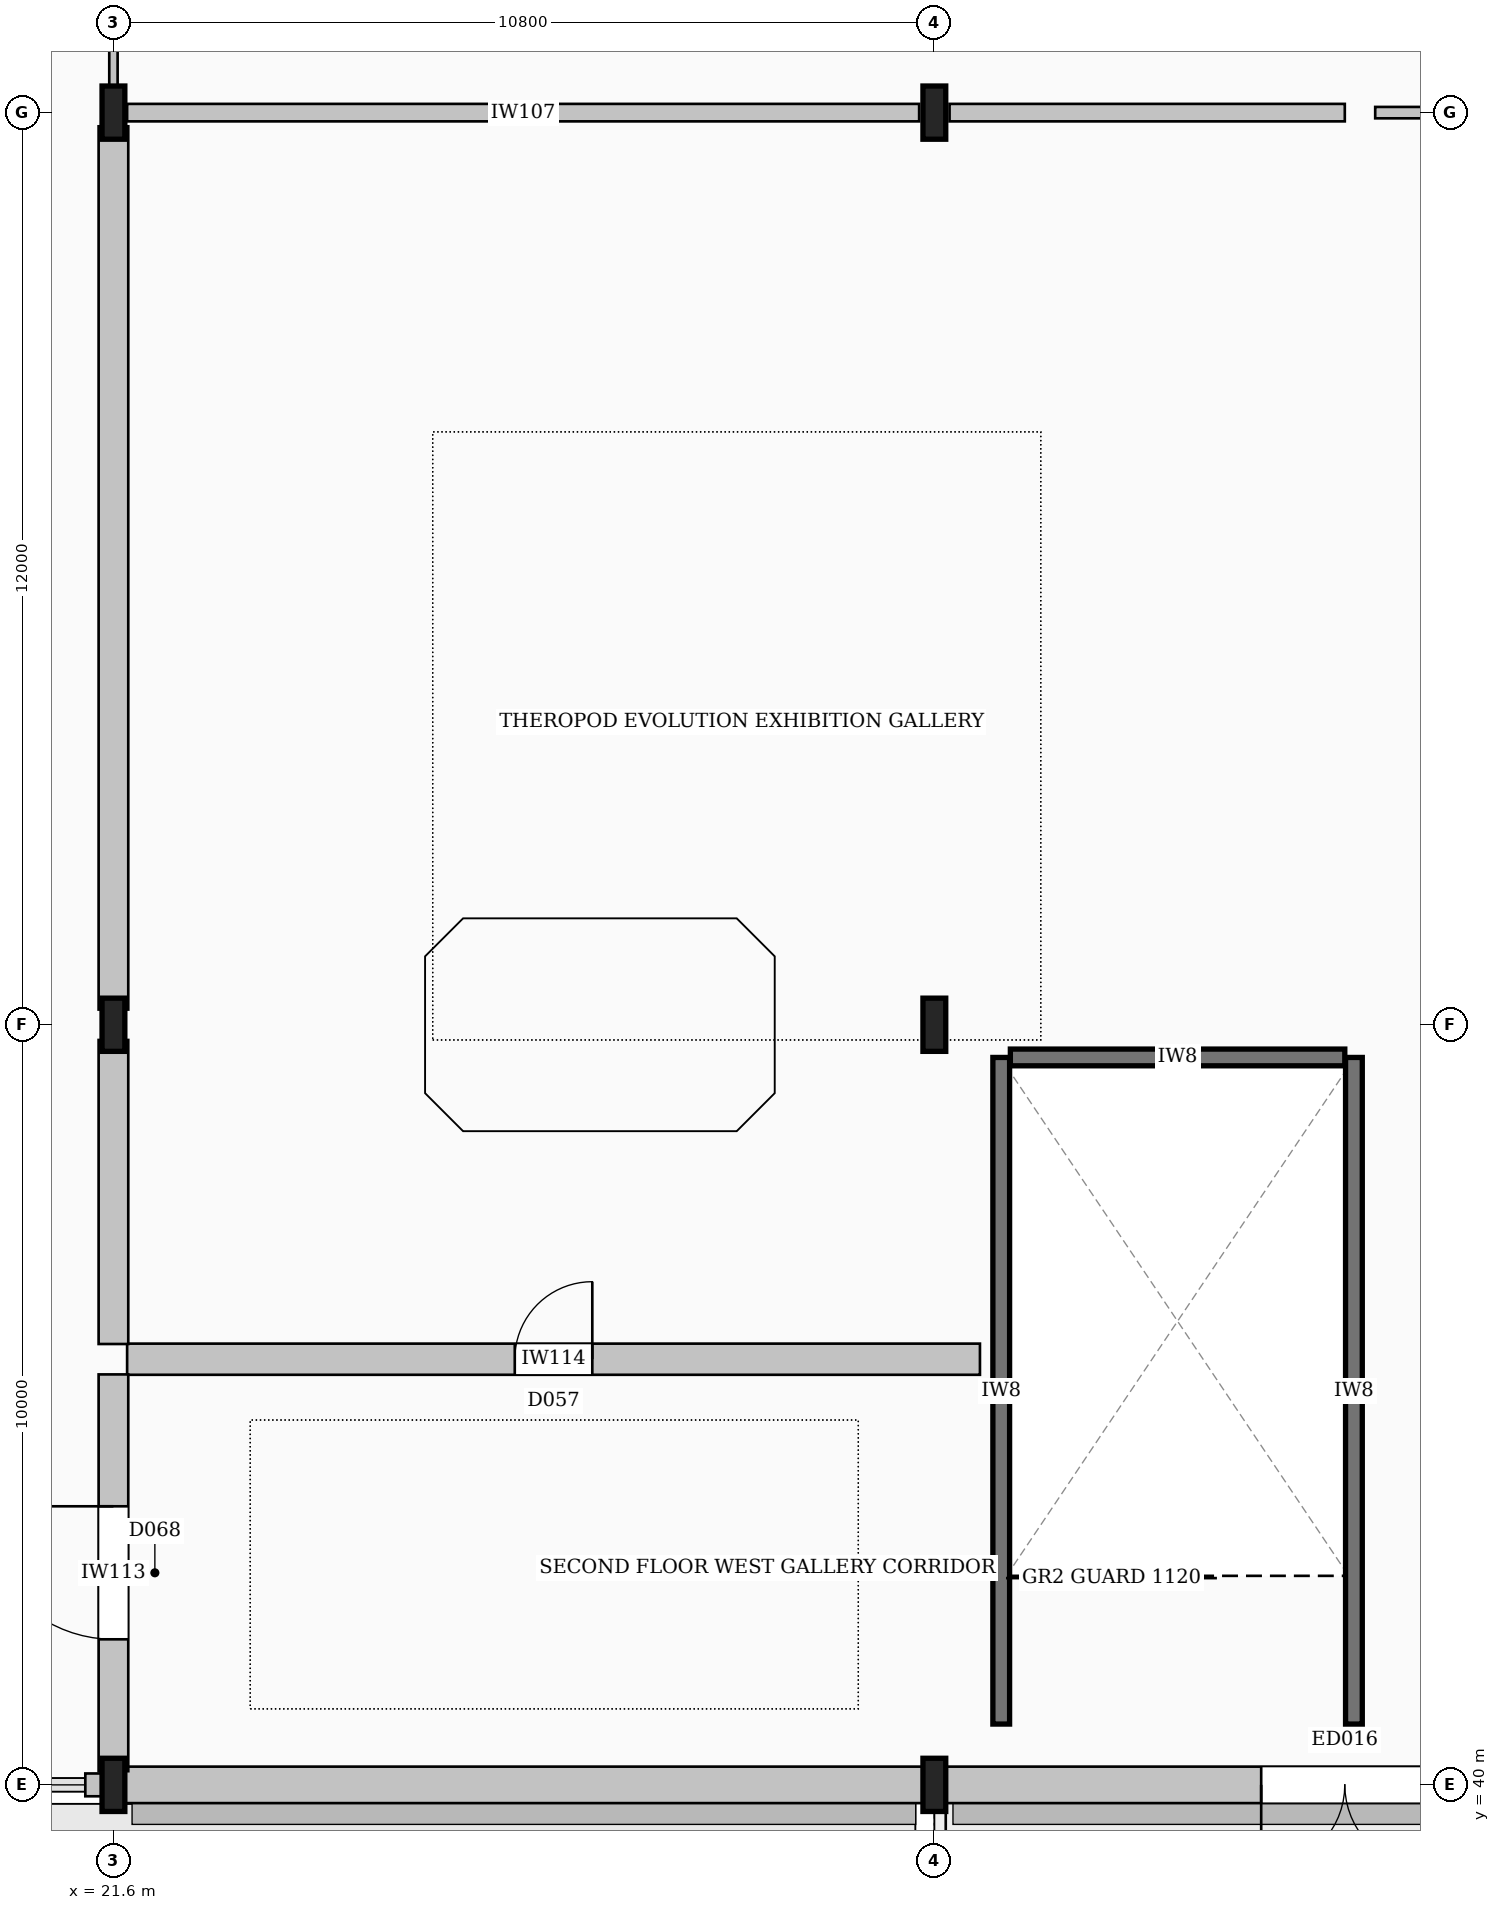
"""IFC4 building model, lengths in metres.
Left out: names, types, materials, properties, quantities, classifications, styles, units other than length and angle.
Written with IfcOpenShell. Run it as: python <this file> out.ifc"""

import sys

from ifc_helpers import new_model, si_unit, direction, frame, frame_2d, origin, origin_2d, place, context, subcontext, project, spatial, rectangle, i_section, extrude, element, fill, save


model = new_model("IFC4")
c1 = context("Model", 3, precision=1e-05, world=origin(), true_north=direction((0.0, 1.0)))
c2 = subcontext(c1, "Body", "Model", "MODEL_VIEW")
j1 = project(units=[si_unit("LENGTHUNIT", "METRE"), si_unit("PLANEANGLEUNIT", "RADIAN")], contexts=[c1])
p1 = place(None, origin())
s1 = spatial("IfcSite", under=j1, at=p1, CompositionType="ELEMENT")
p2 = place(p1, origin())
s2 = spatial("IfcBuilding", under=s1, at=p2, CompositionType="ELEMENT")
p3 = place(p2, frame((0.0, 0.0, 9.6)))
s3 = spatial("IfcBuildingStorey", under=s2, at=p3, CompositionType="ELEMENT", Elevation=9.6)
for number, where, z_axis, x_axis in (
    (1, (21.6, 40.0, 0.0), (0.0, 0.0, 1.0), (1.0, 0.0, 0.0)),
    (2, (21.6, 50.0, 0.0), (0.0, 0.0, 1.0), (1.0, 0.0, 0.0)),
    (3, (21.6, 62.0, 0.0), (0.0, 0.0, 1.0), (1.0, 0.0, 0.0)),
    (4, (32.4, 40.0, 0.0), (0.0, 0.0, 1.0), (1.0, 0.0, 0.0)),
    (5, (32.4, 50.0, 0.0), (0.0, 0.0, 1.0), (1.0, 0.0, 0.0)),
    (6, (32.4, 62.0, 0.0), (0.0, 0.0, 1.0), (1.0, 0.0, 0.0)),
):
    element("IfcColumn", number, at=place(p3, frame(where, z_axis=z_axis, x_axis=x_axis)), inside=s3, PredefinedType="COLUMN", context=c2, shape_type="SweptSolid", body=[
        extrude(i_section(OverallWidth=0.3, OverallDepth=0.7, WebThickness=0.017, FlangeThickness=0.032, FilletRadius=0.027, at=origin_2d()), origin(), (0.0, 0.0, 1.0), 4.8),
    ])
p4 = place(p3, frame((21.23, 40.0, 0.0), z_axis=(0.0, 0.0, 1.0), x_axis=(1.0, 0.0, 0.0)))
e7 = element("IfcWall", 7, at=p4, inside=s3, PredefinedType="STANDARD", context=c2, shape_type="SweptSolid", body=[
    extrude(rectangle(XDim=0.225, YDim=0.3, at=frame_2d((0.113, 0.0))), origin(), (0.0, 0.0, 1.0), 4.56),
])
p5 = place(p3, frame((21.745, 40.0, 0.0), z_axis=(0.0, 0.0, 1.0), x_axis=(1.0, 0.0, 0.0)))
e8 = element("IfcWall", 8, at=p5, inside=s3, PredefinedType="STANDARD", context=c2, shape_type="SweptSolid", body=[
    extrude(rectangle(XDim=10.51, YDim=0.48, at=frame_2d((5.255, 0.0))), origin(), (0.0, 0.0, 1.0), 3.94),
])
p6 = place(p3, frame((32.545, 40.0, 0.0), z_axis=(0.0, 0.0, 1.0), x_axis=(1.0, 0.0, 0.0)))
e9 = element("IfcWall", 9, at=p6, inside=s3, PredefinedType="STANDARD", context=c2, shape_type="SweptSolid", body=[
    extrude(rectangle(XDim=10.51, YDim=0.48, at=frame_2d((5.255, 0.0))), origin(), (0.0, 0.0, 1.0), 4.09),
])
p7 = place(p6, frame((4.155, 0.0, 0.0)))
e10 = element("IfcOpeningElement", 10, at=p7, cuts=e9, PredefinedType="OPENING", context=c2, shape_type="SweptSolid", body=[
    extrude(rectangle(XDim=2.2, YDim=2.4, at=frame_2d((1.1, 1.2))), frame((0.0, 0.25, 0.0), z_axis=(0.0, -1.0, 0.0), x_axis=(1.0, 0.0, 0.0)), (0.0, 0.0, 1.0), 0.5),
])
for number, where, z_axis, x_axis in (
    (11, (33.28, 40.8, 0.0), (0.0, 0.0, 1.0), (0.0, 1.0, 0.0)),
    (12, (37.92, 40.8, 0.0), (0.0, 0.0, 1.0), (0.0, 1.0, 0.0)),
):
    element("IfcWall", number, at=place(p3, frame(where, z_axis=z_axis, x_axis=x_axis)), inside=s3, PredefinedType="SHEAR", context=c2, shape_type="SweptSolid", body=[
        extrude(rectangle(XDim=8.77, YDim=0.22, at=frame_2d((4.385, 0.0))), origin(), (0.0, 0.0, 1.0), 4.56),
    ])
p8 = place(p3, frame((33.4, 49.57, 0.0), z_axis=(0.0, 0.0, 1.0), x_axis=(1.0, 0.0, 0.0)))
e13 = element("IfcWall", 13, at=p8, inside=s3, PredefinedType="SHEAR", context=c2, shape_type="SweptSolid", body=[
    extrude(rectangle(XDim=4.4, YDim=0.22, at=frame_2d((2.2, 0.0))), origin(), (0.0, 0.0, 1.0), 4.56),
])
p9 = place(p3, frame((21.78, 45.6, 0.0), z_axis=(0.0, 0.0, 1.0), x_axis=(1.0, 0.0, 0.0)))
e14 = element("IfcWall", 14, at=p9, inside=s3, PredefinedType="PARTITIONING", context=c2, shape_type="SweptSolid", body=[
    extrude(rectangle(XDim=11.22, YDim=0.41, at=frame_2d((5.61, 0.0))), origin(), (0.0, 0.0, 1.0), 4.52),
])
p10 = place(p9, frame((5.1, 0.0, 0.0)))
e15 = element("IfcOpeningElement", 15, at=p10, cuts=e14, PredefinedType="OPENING", context=c2, shape_type="SweptSolid", body=[
    extrude(rectangle(XDim=1.02, YDim=2.1, at=frame_2d((0.51, 1.05))), frame((0.0, 0.215, 0.0), z_axis=(0.0, -1.0, 0.0), x_axis=(1.0, 0.0, 0.0)), (0.0, 0.0, 1.0), 0.43),
])
p11 = place(p3, frame((38.2, 62.0, 0.0), z_axis=(0.0, 0.0, 1.0), x_axis=(1.0, 0.0, 0.0)))
e16 = element("IfcWall", 16, at=p11, inside=s3, PredefinedType="PARTITIONING", context=c2, shape_type="SweptSolid", body=[
    extrude(rectangle(XDim=4.82, YDim=0.15, at=frame_2d((2.41, 0.0))), origin(), (0.0, 0.0, 1.0), 4.099),
])
p12 = place(p11, frame((1.9, 0.0, 0.0)))
e17 = element("IfcOpeningElement", 17, at=p12, cuts=e16, PredefinedType="OPENING", context=c2, shape_type="SweptSolid", body=[
    extrude(rectangle(XDim=1.02, YDim=2.2, at=frame_2d((0.51, 1.1))), frame((0.0, 0.085, 0.0), z_axis=(0.0, -1.0, 0.0), x_axis=(1.0, 0.0, 0.0)), (0.0, 0.0, 1.0), 0.17),
])
p13 = place(p3, frame((21.6, 40.18, 0.0), z_axis=(0.0, 0.0, 1.0), x_axis=(0.0, 1.0, 0.0)))
e18 = element("IfcWall", 18, at=p13, inside=s3, PredefinedType="PARTITIONING", context=c2, shape_type="SweptSolid", body=[
    extrude(rectangle(XDim=5.22, YDim=0.39, at=frame_2d((2.61, 0.0))), origin(), (0.0, 0.0, 1.0), 4.039),
])
p14 = place(p13, frame((1.735, 0.0, 0.0)))
e19 = element("IfcOpeningElement", 19, at=p14, cuts=e18, PredefinedType="OPENING", context=c2, shape_type="SweptSolid", body=[
    extrude(rectangle(XDim=1.75, YDim=2.45, at=frame_2d((0.875, 1.225))), frame((0.0, 0.205, 0.0), z_axis=(0.0, -1.0, 0.0), x_axis=(1.0, 0.0, 0.0)), (0.0, 0.0, 1.0), 0.41),
])
p15 = place(p3, frame((21.78, 62.0, 0.0), z_axis=(0.0, 0.0, 1.0), x_axis=(1.0, 0.0, 0.0)))
e20 = element("IfcWall", 20, at=p15, inside=s3, PredefinedType="PARTITIONING", context=c2, shape_type="SweptSolid", body=[
    extrude(rectangle(XDim=10.42, YDim=0.23, at=frame_2d((5.21, 0.0))), origin(), (0.0, 0.0, 1.0), 3.94),
])
p16 = place(p3, frame((32.6, 62.0, 0.0), z_axis=(0.0, 0.0, 1.0), x_axis=(1.0, 0.0, 0.0)))
e21 = element("IfcWall", 21, at=p16, inside=s3, PredefinedType="PARTITIONING", context=c2, shape_type="SweptSolid", body=[
    extrude(rectangle(XDim=5.2, YDim=0.23, at=frame_2d((2.6, 0.0))), origin(), (0.0, 0.0, 1.0), 4.099),
])
p17 = place(p3, frame((21.6, 45.8, 0.0), z_axis=(0.0, 0.0, 1.0), x_axis=(0.0, 1.0, 0.0)))
e22 = element("IfcWall", 22, at=p17, inside=s3, PredefinedType="PARTITIONING", context=c2, shape_type="SweptSolid", body=[
    extrude(rectangle(XDim=4.0, YDim=0.39, at=frame_2d((2.0, 0.0))), origin(), (0.0, 0.0, 1.0), 4.039),
])
p18 = place(p3, frame((21.6, 50.2, 0.0), z_axis=(0.0, 0.0, 1.0), x_axis=(0.0, 1.0, 0.0)))
e23 = element("IfcWall", 23, at=p18, inside=s3, PredefinedType="PARTITIONING", context=c2, shape_type="SweptSolid", body=[
    extrude(rectangle(XDim=11.62, YDim=0.39, at=frame_2d((5.81, 0.0))), origin(), (0.0, 0.0, 1.0), 3.94),
])
p19 = place(p3, frame((21.6, 62.18, 0.0), z_axis=(0.0, 0.0, 1.0), x_axis=(0.0, 1.0, 0.0)))
e24 = element("IfcWall", 24, at=p19, inside=s3, PredefinedType="PARTITIONING", context=c2, shape_type="SweptSolid", body=[
    extrude(rectangle(XDim=9.62, YDim=0.11, at=frame_2d((4.81, 0.0))), origin(), (0.0, 0.0, 1.0), 4.039),
])
p20 = place(p7, frame((2.2, 0.0, 0.0), z_axis=(0.0, 0.0, 1.0), x_axis=(-1.0, 0.0, 0.0)))
e25 = element("IfcDoor", 25, at=p20, inside=s3, OperationType="DOUBLE_DOOR_SINGLE_SWING", PredefinedType="DOOR", context=c2, shape_type="SweptSolid", body=[
    extrude(rectangle(XDim=2.2, YDim=2.4, at=frame_2d((1.1, 1.2))), frame((0.0, 0.025, 0.0), z_axis=(0.0, -1.0, 0.0), x_axis=(1.0, 0.0, 0.0)), (0.0, 0.0, 1.0), 0.05),
])
fill(e10, e25)
p21 = place(p10, origin())
e26 = element("IfcDoor", 26, at=p21, inside=s3, OperationType="SINGLE_SWING_RIGHT", PredefinedType="DOOR", context=c2, shape_type="SweptSolid", body=[
    extrude(rectangle(XDim=1.02, YDim=2.1, at=frame_2d((0.51, 1.05))), frame((0.0, 0.025, 0.0), z_axis=(0.0, -1.0, 0.0), x_axis=(1.0, 0.0, 0.0)), (0.0, 0.0, 1.0), 0.05),
])
fill(e15, e26)
p22 = place(p14, origin())
e27 = element("IfcDoor", 27, at=p22, inside=s3, OperationType="SINGLE_SWING_RIGHT", PredefinedType="DOOR", context=c2, shape_type="SweptSolid", body=[
    extrude(rectangle(XDim=1.75, YDim=2.45, at=frame_2d((0.875, 1.225))), frame((0.0, 0.025, 0.0), z_axis=(0.0, -1.0, 0.0), x_axis=(1.0, 0.0, 0.0)), (0.0, 0.0, 1.0), 0.05),
])
fill(e19, e27)
save(model, sys.argv[1])
